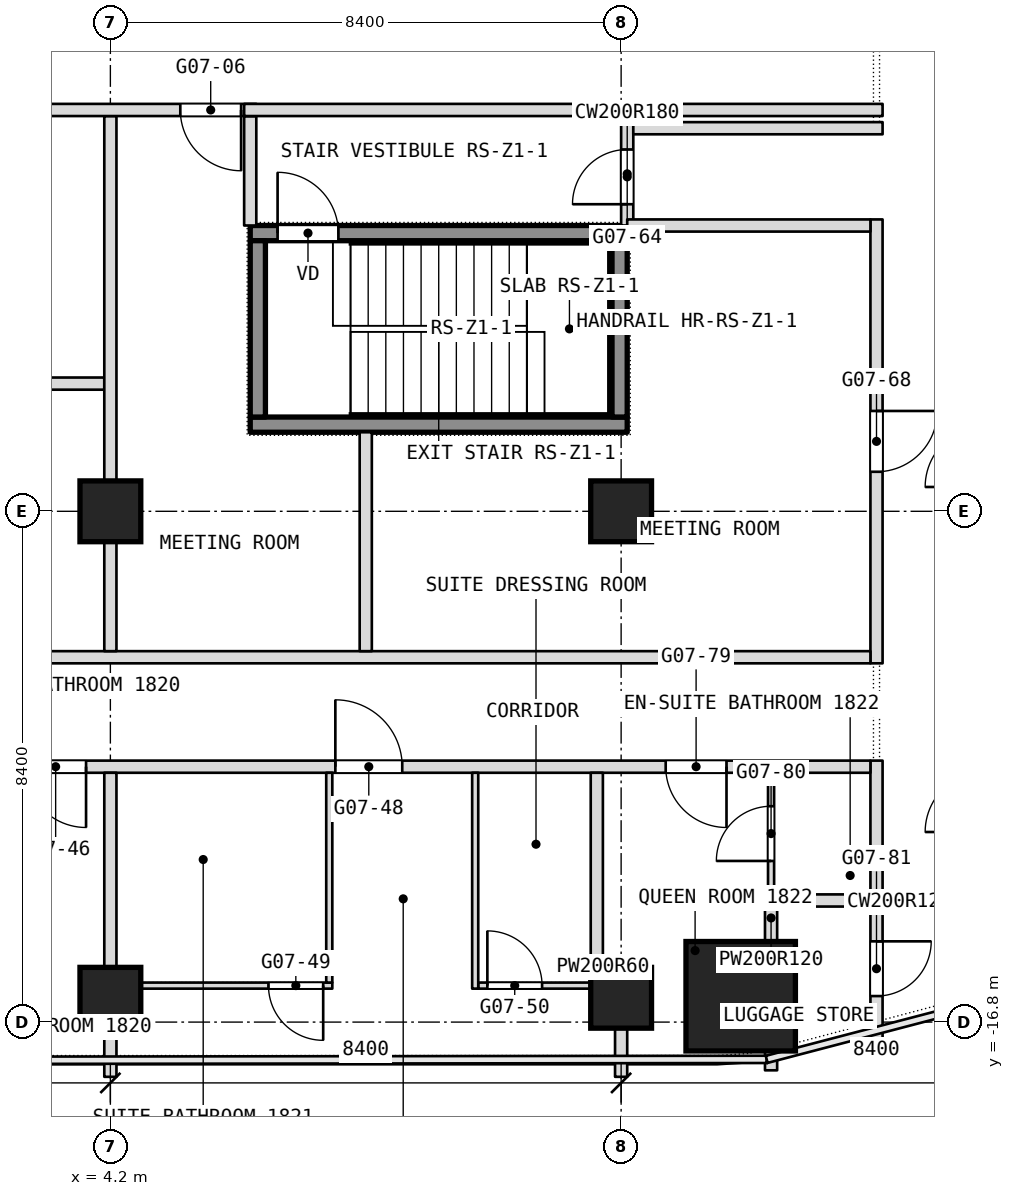
"""IFC4 building model, lengths in metres.
Left out: names, types, materials, properties, quantities, classifications, styles, units other than length and angle.
Written with IfcOpenShell. Run it as: python <this file> out.ifc"""

import sys

from ifc_helpers import new_model, si_unit, direction, frame, frame_2d, origin, origin_2d, place, context, subcontext, project, spatial, rectangle, extrude, element, fill, save


model = new_model("IFC4")
c1 = context("Model", 3, precision=1e-05, world=origin(), true_north=direction((0.0, 1.0)))
c2 = subcontext(c1, "Body", "Model", "MODEL_VIEW")
j1 = project(units=[si_unit("LENGTHUNIT", "METRE"), si_unit("PLANEANGLEUNIT", "RADIAN")], contexts=[c1])
p1 = place(None, origin())
s1 = spatial("IfcSite", under=j1, at=p1, CompositionType="ELEMENT")
p2 = place(p1, origin())
s2 = spatial("IfcBuilding", under=s1, at=p2, CompositionType="ELEMENT")
p3 = place(p2, frame((0.0, 0.0, 79.7)))
s3 = spatial("IfcBuildingStorey", under=s2, at=p3, CompositionType="ELEMENT", Elevation=79.7)
p4 = place(p3, frame((14.566, -16.375, 0.0), z_axis=(0.0, 0.0, 1.0), x_axis=(1.0, 0.0, 0.0)))
e1 = element("IfcColumn", 1, at=p4, inside=s3, PredefinedType="COLUMN", context=c2, shape_type="SweptSolid", body=[
    extrude(rectangle(XDim=1.8, YDim=1.8, at=origin_2d()), origin(), (0.0, 0.0, 1.0), 3.6),
])
for number, where, z_axis, x_axis in (
    (2, (4.2, -8.4, 0.0), (0.0, 0.0, 1.0), (1.0, 0.0, 0.0)),
    (3, (12.6, -8.4, 0.0), (0.0, 0.0, 1.0), (1.0, 0.0, 0.0)),
    (4, (12.6, -16.4, 0.0), (0.0, 0.0, 1.0), (1.0, 0.0, 0.0)),
    (5, (4.2, -16.4, 0.0), (0.0, 0.0, 1.0), (1.0, 0.0, 0.0)),
):
    element("IfcColumn", number, at=place(p3, frame(where, z_axis=z_axis, x_axis=x_axis)), inside=s3, PredefinedType="COLUMN", context=c2, shape_type="SweptSolid", body=[
        extrude(rectangle(XDim=1.0, YDim=1.0, at=origin_2d()), origin(), (0.0, 0.0, 1.0), 3.6),
    ])
p5 = place(p3, frame((16.8, -17.143, 0.0), z_axis=(0.0, 0.0, 1.0), x_axis=(0.0, 1.0, 0.0)))
e6 = element("IfcWall", 6, at=p5, inside=s3, PredefinedType="PARTITIONING", context=c2, shape_type="SweptSolid", body=[
    extrude(rectangle(XDim=4.643, YDim=0.2, at=frame_2d((2.322, 0.0))), origin(), (0.0, 0.0, 1.0), 3.34),
])
p6 = place(p5, frame((0.771, 0.0, 0.0)))
e7 = element("IfcOpeningElement", 7, at=p6, cuts=e6, PredefinedType="OPENING", context=c2, shape_type="SweptSolid", body=[
    extrude(rectangle(XDim=0.9, YDim=2.1, at=frame_2d((0.45, 1.05))), frame((0.0, 0.1, 0.0), z_axis=(0.0, -1.0, 0.0), x_axis=(1.0, 0.0, 0.0)), (0.0, 0.0, 1.0), 0.2),
])
p7 = place(p3, frame((16.8, -10.9, 0.0), z_axis=(0.0, 0.0, 1.0), x_axis=(0.0, 1.0, 0.0)))
e8 = element("IfcWall", 8, at=p7, inside=s3, PredefinedType="PARTITIONING", context=c2, shape_type="SweptSolid", body=[
    extrude(rectangle(XDim=7.3, YDim=0.2, at=frame_2d((3.65, 0.0))), origin(), (0.0, 0.0, 1.0), 3.34),
])
p8 = place(p7, frame((3.15, 0.0, 0.0)))
e9 = element("IfcOpeningElement", 9, at=p8, cuts=e8, PredefinedType="OPENING", context=c2, shape_type="SweptSolid", body=[
    extrude(rectangle(XDim=1.0, YDim=2.1, at=frame_2d((0.5, 1.05))), frame((0.0, 0.1, 0.0), z_axis=(0.0, -1.0, 0.0), x_axis=(1.0, 0.0, 0.0)), (0.0, 0.0, 1.0), 0.2),
])
p9 = place(p3, frame((4.3, -16.2, 0.0), z_axis=(0.0, 0.0, 1.0), x_axis=(1.0, 0.0, 0.0)))
e10 = element("IfcWall", 10, at=p9, inside=s3, PredefinedType="PARTITIONING", context=c2, shape_type="SweptSolid", body=[
    extrude(rectangle(XDim=3.55, YDim=0.1, at=frame_2d((1.775, 0.0))), origin(), (0.0, 0.0, 1.0), 2.94),
])
p10 = place(p9, frame((2.5, 0.0, 0.0)))
e11 = element("IfcOpeningElement", 11, at=p10, cuts=e10, PredefinedType="OPENING", context=c2, shape_type="SweptSolid", body=[
    extrude(rectangle(XDim=0.9, YDim=2.1, at=frame_2d((0.45, 1.05))), frame((0.0, 0.05, 0.0), z_axis=(0.0, -1.0, 0.0), x_axis=(1.0, 0.0, 0.0)), (0.0, 0.0, 1.0), 0.1),
])
p11 = place(p3, frame((10.25, -16.2, 0.0), z_axis=(0.0, 0.0, 1.0), x_axis=(1.0, 0.0, 0.0)))
e12 = element("IfcWall", 12, at=p11, inside=s3, PredefinedType="PARTITIONING", context=c2, shape_type="SweptSolid", body=[
    extrude(rectangle(XDim=2.45, YDim=0.1, at=frame_2d((1.225, 0.0))), origin(), (0.0, 0.0, 1.0), 3.34),
])
p12 = place(p11, frame((0.15, 0.0, 0.0)))
e13 = element("IfcOpeningElement", 13, at=p12, cuts=e12, PredefinedType="OPENING", context=c2, shape_type="SweptSolid", body=[
    extrude(rectangle(XDim=0.9, YDim=2.1, at=frame_2d((0.45, 1.05))), frame((0.0, 0.05, 0.0), z_axis=(0.0, -1.0, 0.0), x_axis=(1.0, 0.0, 0.0)), (0.0, 0.0, 1.0), 0.1),
])
p13 = place(p3, frame((12.1, -15.9, 0.0), z_axis=(0.0, 0.0, 1.0), x_axis=(1.0, 0.0, 0.0)))
e14 = element("IfcWall", 14, at=p13, inside=s3, PredefinedType="PARTITIONING", context=c2, shape_type="SweptSolid", body=[
    extrude(rectangle(XDim=0.4, YDim=0.2, at=frame_2d((0.2, 0.0))), origin(), (0.0, 0.0, 1.0), 3.34),
])
p14 = place(p3, frame((15.066, -17.593, 0.0), z_axis=(0.0, 0.0, 1.0), x_axis=(0.0, 1.0, 0.0)))
e15 = element("IfcWall", 15, at=p14, inside=s3, PredefinedType="PARTITIONING", context=c2, shape_type="SweptSolid", body=[
    extrude(rectangle(XDim=0.318, YDim=0.2, at=frame_2d((0.159, 0.0))), origin(), (0.0, 0.0, 1.0), 3.34),
])
p15 = place(p3, frame((15.066, -15.475, 0.0), z_axis=(0.0, 0.0, 1.0), x_axis=(0.0, 1.0, 0.0)))
e16 = element("IfcWall", 16, at=p15, inside=s3, PredefinedType="PARTITIONING", context=c2, shape_type="SweptSolid", body=[
    extrude(rectangle(XDim=0.775, YDim=0.2, at=frame_2d((0.388, 0.0))), origin(), (0.0, 0.0, 1.0), 3.34),
])
p16 = place(p3, frame((15.066, -14.9, 0.0), z_axis=(0.0, 0.0, 1.0), x_axis=(0.0, 1.0, 0.0)))
e17 = element("IfcWall", 17, at=p16, inside=s3, PredefinedType="PARTITIONING", context=c2, shape_type="SweptSolid", body=[
    extrude(rectangle(XDim=2.2, YDim=0.1, at=frame_2d((1.1, 0.0))), origin(), (0.0, 0.0, 1.0), 3.34),
])
p17 = place(p16, frame((0.75, 0.0, 0.0)))
e18 = element("IfcOpeningElement", 18, at=p17, cuts=e17, PredefinedType="OPENING", context=c2, shape_type="SweptSolid", body=[
    extrude(rectangle(XDim=0.9, YDim=2.1, at=frame_2d((0.45, 1.05))), frame((0.0, 0.05, 0.0), z_axis=(0.0, -1.0, 0.0), x_axis=(1.0, 0.0, 0.0)), (0.0, 0.0, 1.0), 0.1),
])
p18 = place(p3, frame((15.116, -14.8, 0.0), z_axis=(0.0, 0.0, 1.0), x_axis=(1.0, 0.0, 0.0)))
e19 = element("IfcWall", 19, at=p18, inside=s3, PredefinedType="PARTITIONING", context=c2, shape_type="SweptSolid", body=[
    extrude(rectangle(XDim=1.584, YDim=0.2, at=frame_2d((0.792, 0.0))), origin(), (0.0, 0.0, 1.0), 3.34),
])
p19 = place(p3, frame((12.7, -3.7, 0.0), z_axis=(0.0, 0.0, 1.0), x_axis=(0.0, 1.0, 0.0)))
e20 = element("IfcWall", 20, at=p19, inside=s3, PredefinedType="PARTITIONING", context=c2, shape_type="SweptSolid", body=[
    extrude(rectangle(XDim=1.7, YDim=0.2, at=frame_2d((0.85, 0.0))), origin(), (0.0, 0.0, 1.0), 3.34),
])
p20 = place(p19, frame((0.35, 0.0, 0.0)))
e21 = element("IfcOpeningElement", 21, at=p20, cuts=e20, PredefinedType="OPENING", context=c2, shape_type="SweptSolid", body=[
    extrude(rectangle(XDim=0.9, YDim=2.1, at=frame_2d((0.45, 1.05))), frame((0.0, 0.1, 0.0), z_axis=(0.0, -1.0, 0.0), x_axis=(1.0, 0.0, 0.0)), (0.0, 0.0, 1.0), 0.2),
])
p21 = place(p3, frame((12.6, -17.7, 0.0), z_axis=(0.0, 0.0, 1.0), x_axis=(0.0, 1.0, 0.0)))
e22 = element("IfcWall", 22, at=p21, inside=s3, PredefinedType="PARTITIONING", context=c2, shape_type="SweptSolid", body=[
    extrude(rectangle(XDim=1.9, YDim=0.2, at=frame_2d((0.95, 0.0))), origin(), (0.0, 0.0, 1.0), 3.34),
])
p22 = place(p3, frame((-16.7, -12.6, 0.0), z_axis=(0.0, 0.0, 1.0), x_axis=(1.0, 0.0, 0.0)))
e23 = element("IfcWall", 23, at=p22, inside=s3, PredefinedType="PARTITIONING", context=c2, shape_type="SweptSolid", body=[
    extrude(rectangle(XDim=33.4, YDim=0.2, at=frame_2d((16.7, 0.0))), origin(), (0.0, 0.0, 1.0), 3.34),
])
p23 = place(p22, frame((7.8, 0.0, 0.0)))
e24 = element("IfcOpeningElement", 24, at=p23, cuts=e23, PredefinedType="OPENING", context=c2, shape_type="SweptSolid", body=[
    extrude(rectangle(XDim=1.1, YDim=2.1, at=frame_2d((0.55, 1.05))), frame((0.0, 0.1, 0.0), z_axis=(0.0, -1.0, 0.0), x_axis=(1.0, 0.0, 0.0)), (0.0, 0.0, 1.0), 0.2),
])
p24 = place(p22, frame((12.9, 0.0, 0.0)))
e25 = element("IfcOpeningElement", 25, at=p24, cuts=e23, PredefinedType="OPENING", context=c2, shape_type="SweptSolid", body=[
    extrude(rectangle(XDim=1.0, YDim=2.1, at=frame_2d((0.5, 1.05))), frame((0.0, 0.1, 0.0), z_axis=(0.0, -1.0, 0.0), x_axis=(1.0, 0.0, 0.0)), (0.0, 0.0, 1.0), 0.2),
])
p25 = place(p22, frame((19.5, 0.0, 0.0)))
e26 = element("IfcOpeningElement", 26, at=p25, cuts=e23, PredefinedType="OPENING", context=c2, shape_type="SweptSolid", body=[
    extrude(rectangle(XDim=1.0, YDim=2.1, at=frame_2d((0.5, 1.05))), frame((0.0, 0.1, 0.0), z_axis=(0.0, -1.0, 0.0), x_axis=(1.0, 0.0, 0.0)), (0.0, 0.0, 1.0), 0.2),
])
p26 = place(p22, frame((24.6, 0.0, 0.0)))
e27 = element("IfcOpeningElement", 27, at=p26, cuts=e23, PredefinedType="OPENING", context=c2, shape_type="SweptSolid", body=[
    extrude(rectangle(XDim=1.1, YDim=2.1, at=frame_2d((0.55, 1.05))), frame((0.0, 0.1, 0.0), z_axis=(0.0, -1.0, 0.0), x_axis=(1.0, 0.0, 0.0)), (0.0, 0.0, 1.0), 0.2),
])
p27 = place(p22, frame((2.367, 0.0, 0.0)))
e28 = element("IfcOpeningElement", 28, at=p27, cuts=e23, PredefinedType="OPENING", context=c2, shape_type="SweptSolid", body=[
    extrude(rectangle(XDim=1.0, YDim=2.1, at=frame_2d((0.5, 1.05))), frame((0.0, 0.1, 0.0), z_axis=(0.0, -1.0, 0.0), x_axis=(1.0, 0.0, 0.0)), (0.0, 0.0, 1.0), 0.2),
])
p28 = place(p22, frame((30.033, 0.0, 0.0)))
e29 = element("IfcOpeningElement", 29, at=p28, cuts=e23, PredefinedType="OPENING", context=c2, shape_type="SweptSolid", body=[
    extrude(rectangle(XDim=1.0, YDim=2.1, at=frame_2d((0.5, 1.05))), frame((0.0, 0.1, 0.0), z_axis=(0.0, -1.0, 0.0), x_axis=(1.0, 0.0, 0.0)), (0.0, 0.0, 1.0), 0.2),
])
p29 = place(p3, frame((12.2, -15.8, 0.0), z_axis=(0.0, 0.0, 1.0), x_axis=(0.0, 1.0, 0.0)))
e30 = element("IfcWall", 30, at=p29, inside=s3, PredefinedType="PARTITIONING", context=c2, shape_type="SweptSolid", body=[
    extrude(rectangle(XDim=3.1, YDim=0.2, at=frame_2d((1.55, 0.0))), origin(), (0.0, 0.0, 1.0), 3.34),
])
p30 = place(p3, frame((-4.1, -10.8, 0.0), z_axis=(0.0, 0.0, 1.0), x_axis=(1.0, 0.0, 0.0)))
e31 = element("IfcWall", 31, at=p30, inside=s3, PredefinedType="PARTITIONING", context=c2, shape_type="SweptSolid", body=[
    extrude(rectangle(XDim=20.8, YDim=0.2, at=frame_2d((10.4, 0.0))), origin(), (0.0, 0.0, 1.0), 3.34),
])
p31 = place(p30, frame((3.7, 0.0, 0.0)))
e32 = element("IfcOpeningElement", 32, at=p31, cuts=e31, PredefinedType="OPENING", context=c2, shape_type="SweptSolid", body=[
    extrude(rectangle(XDim=1.0, YDim=2.1, at=frame_2d((0.5, 1.05))), frame((0.0, 0.1, 0.0), z_axis=(0.0, -1.0, 0.0), x_axis=(1.0, 0.0, 0.0)), (0.0, 0.0, 1.0), 0.2),
])
p32 = place(p3, frame((10.2, -16.25, 0.0), z_axis=(0.0, 0.0, 1.0), x_axis=(0.0, 1.0, 0.0)))
e33 = element("IfcWall", 33, at=p32, inside=s3, PredefinedType="PARTITIONING", context=c2, shape_type="SweptSolid", body=[
    extrude(rectangle(XDim=3.55, YDim=0.1, at=frame_2d((1.775, 0.0))), origin(), (0.0, 0.0, 1.0), 3.34),
])
p33 = place(p3, frame((8.4, -10.7, 0.0), z_axis=(0.0, 0.0, 1.0), x_axis=(0.0, 1.0, 0.0)))
e34 = element("IfcWall", 34, at=p33, inside=s3, PredefinedType="PARTITIONING", context=c2, shape_type="SweptSolid", body=[
    extrude(rectangle(XDim=3.6, YDim=0.2, at=frame_2d((1.8, 0.0))), origin(), (0.0, 0.0, 1.0), 3.34),
])
p34 = place(p3, frame((7.8, -16.15, 0.0), z_axis=(0.0, 0.0, 1.0), x_axis=(0.0, 1.0, 0.0)))
e35 = element("IfcWall", 35, at=p34, inside=s3, PredefinedType="PARTITIONING", context=c2, shape_type="SweptSolid", body=[
    extrude(rectangle(XDim=3.45, YDim=0.1, at=frame_2d((1.725, 0.0))), origin(), (0.0, 0.0, 1.0), 3.34),
])
p35 = place(p3, frame((6.5, -3.7, 0.0), z_axis=(0.0, 0.0, 1.0), x_axis=(0.0, 1.0, 0.0)))
e36 = element("IfcWall", 36, at=p35, inside=s3, PredefinedType="PARTITIONING", context=c2, shape_type="SweptSolid", body=[
    extrude(rectangle(XDim=1.8, YDim=0.2, at=frame_2d((0.9, 0.0))), origin(), (0.0, 0.0, 1.0), 3.34),
])
p36 = place(p3, frame((-4.1, -6.3, 0.0), z_axis=(0.0, 0.0, 1.0), x_axis=(1.0, 0.0, 0.0)))
e37 = element("IfcWall", 37, at=p36, inside=s3, PredefinedType="PARTITIONING", context=c2, shape_type="SweptSolid", body=[
    extrude(rectangle(XDim=8.2, YDim=0.2, at=frame_2d((4.1, 0.0))), origin(), (0.0, 0.0, 1.0), 3.34),
])
p37 = place(p3, frame((4.2, -17.7, 0.0), z_axis=(0.0, 0.0, 1.0), x_axis=(0.0, 1.0, 0.0)))
e38 = element("IfcWall", 38, at=p37, inside=s3, PredefinedType="PARTITIONING", context=c2, shape_type="SweptSolid", body=[
    extrude(rectangle(XDim=5.0, YDim=0.2, at=frame_2d((2.5, 0.0))), origin(), (0.0, 0.0, 1.0), 3.34),
])
p38 = place(p3, frame((4.2, -10.7, 0.0), z_axis=(0.0, 0.0, 1.0), x_axis=(0.0, 1.0, 0.0)))
e39 = element("IfcWall", 39, at=p38, inside=s3, PredefinedType="PARTITIONING", context=c2, shape_type="SweptSolid", body=[
    extrude(rectangle(XDim=8.8, YDim=0.2, at=frame_2d((4.4, 0.0))), origin(), (0.0, 0.0, 1.0), 3.34),
])
p39 = place(p3, frame((12.7, -3.7, 0.0), z_axis=(0.0, 0.0, 1.0), x_axis=(1.0, 0.0, 0.0)))
e40 = element("IfcWall", 40, at=p39, inside=s3, PredefinedType="PARTITIONING", context=c2, shape_type="SweptSolid", body=[
    extrude(rectangle(XDim=4.0, YDim=0.2, at=frame_2d((2.0, 0.0))), origin(), (0.0, 0.0, 1.0), 3.34),
])
p40 = place(p3, frame((12.8, -2.1, 0.0), z_axis=(0.0, 0.0, 1.0), x_axis=(1.0, 0.0, 0.0)))
e41 = element("IfcWall", 41, at=p40, inside=s3, PredefinedType="PARTITIONING", context=c2, shape_type="SweptSolid", body=[
    extrude(rectangle(XDim=4.1, YDim=0.2, at=frame_2d((2.05, 0.0))), origin(), (0.0, 0.0, 1.0), 3.34),
])
p41 = place(p3, frame((-4.3, -1.8, 0.0), z_axis=(0.0, 0.0, 1.0), x_axis=(1.0, 0.0, 0.0)))
e42 = element("IfcWall", 42, at=p41, inside=s3, PredefinedType="PARTITIONING", context=c2, shape_type="SweptSolid", body=[
    extrude(rectangle(XDim=10.9, YDim=0.2, at=frame_2d((5.45, 0.0))), origin(), (0.0, 0.0, 1.0), 3.34),
])
p42 = place(p41, frame((9.65, 0.0, 0.0)))
e43 = element("IfcOpeningElement", 43, at=p42, cuts=e42, PredefinedType="OPENING", context=c2, shape_type="SweptSolid", body=[
    extrude(rectangle(XDim=1.0, YDim=2.1, at=frame_2d((0.5, 1.05))), frame((0.0, 0.1, 0.0), z_axis=(0.0, -1.0, 0.0), x_axis=(1.0, 0.0, 0.0)), (0.0, 0.0, 1.0), 0.2),
])
p43 = place(p41, frame((3.8, 0.0, 0.0)))
e44 = element("IfcOpeningElement", 44, at=p43, cuts=e42, PredefinedType="OPENING", context=c2, shape_type="SweptSolid", body=[
    extrude(rectangle(XDim=1.0, YDim=2.1, at=frame_2d((0.5, 1.05))), frame((0.0, 0.1, 0.0), z_axis=(0.0, -1.0, 0.0), x_axis=(1.0, 0.0, 0.0)), (0.0, 0.0, 1.0), 0.2),
])
p44 = place(p3, frame((6.4, -1.8, 0.0), z_axis=(0.0, 0.0, 1.0), x_axis=(1.0, 0.0, 0.0)))
e45 = element("IfcWall", 45, at=p44, inside=s3, PredefinedType="PARTITIONING", context=c2, shape_type="SweptSolid", body=[
    extrude(rectangle(XDim=10.5, YDim=0.2, at=frame_2d((5.25, 0.0))), origin(), (0.0, 0.0, 1.0), 3.34),
])
p45 = place(p3, frame((6.5, -6.975, 0.1), z_axis=(0.0, 0.0, 1.0), x_axis=(1.0, 0.0, 0.0)))
e46 = element("IfcWall", 46, at=p45, inside=s3, PredefinedType="SHEAR", context=c2, shape_type="SweptSolid", body=[
    extrude(rectangle(XDim=6.2, YDim=0.25, at=frame_2d((3.1, 0.0))), origin(), (0.0, 0.0, 1.0), 3.6),
])
p46 = place(p3, frame((6.5, -3.825, 0.1), z_axis=(0.0, 0.0, 1.0), x_axis=(1.0, 0.0, 0.0)))
e47 = element("IfcWall", 47, at=p46, inside=s3, PredefinedType="SHEAR", context=c2, shape_type="SweptSolid", body=[
    extrude(rectangle(XDim=6.2, YDim=0.25, at=frame_2d((3.1, 0.0))), origin(), (0.0, 0.0, 1.0), 3.6),
])
p47 = place(p46, frame((0.45, 0.0, 0.0)))
e48 = element("IfcOpeningElement", 48, at=p47, cuts=e47, PredefinedType="OPENING", context=c2, shape_type="SweptSolid", body=[
    extrude(rectangle(XDim=1.0, YDim=2.1, at=frame_2d((0.5, 1.05))), frame((0.0, 0.125, 0.0), z_axis=(0.0, -1.0, 0.0), x_axis=(1.0, 0.0, 0.0)), (0.0, 0.0, 1.0), 0.25),
])
for number, where, z_axis, x_axis in (
    (49, (6.625, -6.85, 0.1), (0.0, 0.0, 1.0), (0.0, 1.0, 0.0)),
    (50, (12.575, -6.85, 0.1), (0.0, 0.0, 1.0), (0.0, 1.0, 0.0)),
):
    element("IfcWall", number, at=place(p3, frame(where, z_axis=z_axis, x_axis=x_axis)), inside=s3, PredefinedType="SHEAR", context=c2, shape_type="SweptSolid", body=[
        extrude(rectangle(XDim=2.9, YDim=0.25, at=frame_2d((1.45, 0.0))), origin(), (0.0, 0.0, 1.0), 3.6),
    ])
p48 = place(p6, origin())
e51 = element("IfcDoor", 51, at=p48, inside=s3, OperationType="SINGLE_SWING_RIGHT", PredefinedType="DOOR", context=c2, shape_type="SweptSolid", body=[
    extrude(rectangle(XDim=0.9, YDim=2.1, at=frame_2d((0.45, 1.05))), frame((0.0, 0.025, 0.0), z_axis=(0.0, -1.0, 0.0), x_axis=(1.0, 0.0, 0.0)), (0.0, 0.0, 1.0), 0.05),
])
fill(e7, e51)
p49 = place(p8, origin())
e52 = element("IfcDoor", 52, at=p49, inside=s3, OperationType="SINGLE_SWING_RIGHT", PredefinedType="DOOR", context=c2, shape_type="SweptSolid", body=[
    extrude(rectangle(XDim=1.0, YDim=2.1, at=frame_2d((0.5, 1.05))), frame((0.0, 0.025, 0.0), z_axis=(0.0, -1.0, 0.0), x_axis=(1.0, 0.0, 0.0)), (0.0, 0.0, 1.0), 0.05),
])
fill(e9, e52)
p50 = place(p10, origin())
e53 = element("IfcDoor", 53, at=p50, inside=s3, OperationType="SINGLE_SWING_RIGHT", PredefinedType="DOOR", context=c2, shape_type="SweptSolid", body=[
    extrude(rectangle(XDim=0.9, YDim=2.1, at=frame_2d((0.45, 1.05))), frame((0.0, 0.025, 0.0), z_axis=(0.0, -1.0, 0.0), x_axis=(1.0, 0.0, 0.0)), (0.0, 0.0, 1.0), 0.05),
])
fill(e11, e53)
p51 = place(p12, origin())
e54 = element("IfcDoor", 54, at=p51, inside=s3, OperationType="SINGLE_SWING_LEFT", PredefinedType="DOOR", context=c2, shape_type="SweptSolid", body=[
    extrude(rectangle(XDim=0.9, YDim=2.1, at=frame_2d((0.45, 1.05))), frame((0.0, 0.025, 0.0), z_axis=(0.0, -1.0, 0.0), x_axis=(1.0, 0.0, 0.0)), (0.0, 0.0, 1.0), 0.05),
])
fill(e13, e54)
p52 = place(p17, origin())
e55 = element("IfcDoor", 55, at=p52, inside=s3, OperationType="SINGLE_SWING_RIGHT", PredefinedType="DOOR", context=c2, shape_type="SweptSolid", body=[
    extrude(rectangle(XDim=0.9, YDim=2.1, at=frame_2d((0.45, 1.05))), frame((0.0, 0.025, 0.0), z_axis=(0.0, -1.0, 0.0), x_axis=(1.0, 0.0, 0.0)), (0.0, 0.0, 1.0), 0.05),
])
fill(e18, e55)
p53 = place(p20, origin())
e56 = element("IfcDoor", 56, at=p53, inside=s3, OperationType="SINGLE_SWING_LEFT", PredefinedType="DOOR", context=c2, shape_type="SweptSolid", body=[
    extrude(rectangle(XDim=0.9, YDim=2.1, at=frame_2d((0.45, 1.05))), frame((0.0, 0.025, 0.0), z_axis=(0.0, -1.0, 0.0), x_axis=(1.0, 0.0, 0.0)), (0.0, 0.0, 1.0), 0.05),
])
fill(e21, e56)
p54 = place(p25, origin())
e57 = element("IfcDoor", 57, at=p54, inside=s3, OperationType="SINGLE_SWING_RIGHT", PredefinedType="DOOR", context=c2, shape_type="SweptSolid", body=[
    extrude(rectangle(XDim=1.0, YDim=2.1, at=frame_2d((0.5, 1.05))), frame((0.0, 0.025, 0.0), z_axis=(0.0, -1.0, 0.0), x_axis=(1.0, 0.0, 0.0)), (0.0, 0.0, 1.0), 0.05),
])
fill(e26, e57)
p55 = place(p26, origin())
e58 = element("IfcDoor", 58, at=p55, inside=s3, OperationType="SINGLE_SWING_RIGHT", PredefinedType="DOOR", context=c2, shape_type="SweptSolid", body=[
    extrude(rectangle(XDim=1.1, YDim=2.1, at=frame_2d((0.55, 1.05))), frame((0.0, 0.025, 0.0), z_axis=(0.0, -1.0, 0.0), x_axis=(1.0, 0.0, 0.0)), (0.0, 0.0, 1.0), 0.05),
])
fill(e27, e58)
p56 = place(p28, origin())
e59 = element("IfcDoor", 59, at=p56, inside=s3, OperationType="SINGLE_SWING_LEFT", PredefinedType="DOOR", context=c2, shape_type="SweptSolid", body=[
    extrude(rectangle(XDim=1.0, YDim=2.1, at=frame_2d((0.5, 1.05))), frame((0.0, 0.025, 0.0), z_axis=(0.0, -1.0, 0.0), x_axis=(1.0, 0.0, 0.0)), (0.0, 0.0, 1.0), 0.05),
])
fill(e29, e59)
p57 = place(p42, origin())
e60 = element("IfcDoor", 60, at=p57, inside=s3, OperationType="SINGLE_SWING_LEFT", PredefinedType="DOOR", context=c2, shape_type="SweptSolid", body=[
    extrude(rectangle(XDim=1.0, YDim=2.1, at=frame_2d((0.5, 1.05))), frame((0.0, 0.025, 0.0), z_axis=(0.0, -1.0, 0.0), x_axis=(1.0, 0.0, 0.0)), (0.0, 0.0, 1.0), 0.05),
])
fill(e43, e60)
p58 = place(p47, origin())
e61 = element("IfcDoor", 61, at=p58, inside=s3, OperationType="SINGLE_SWING_LEFT", PredefinedType="DOOR", context=c2, shape_type="SweptSolid", body=[
    extrude(rectangle(XDim=1.0, YDim=2.1, at=frame_2d((0.5, 1.05))), frame((0.0, 0.025, 0.0), z_axis=(0.0, -1.0, 0.0), x_axis=(1.0, 0.0, 0.0)), (0.0, 0.0, 1.0), 0.05),
])
fill(e48, e61)
save(model, sys.argv[1])
